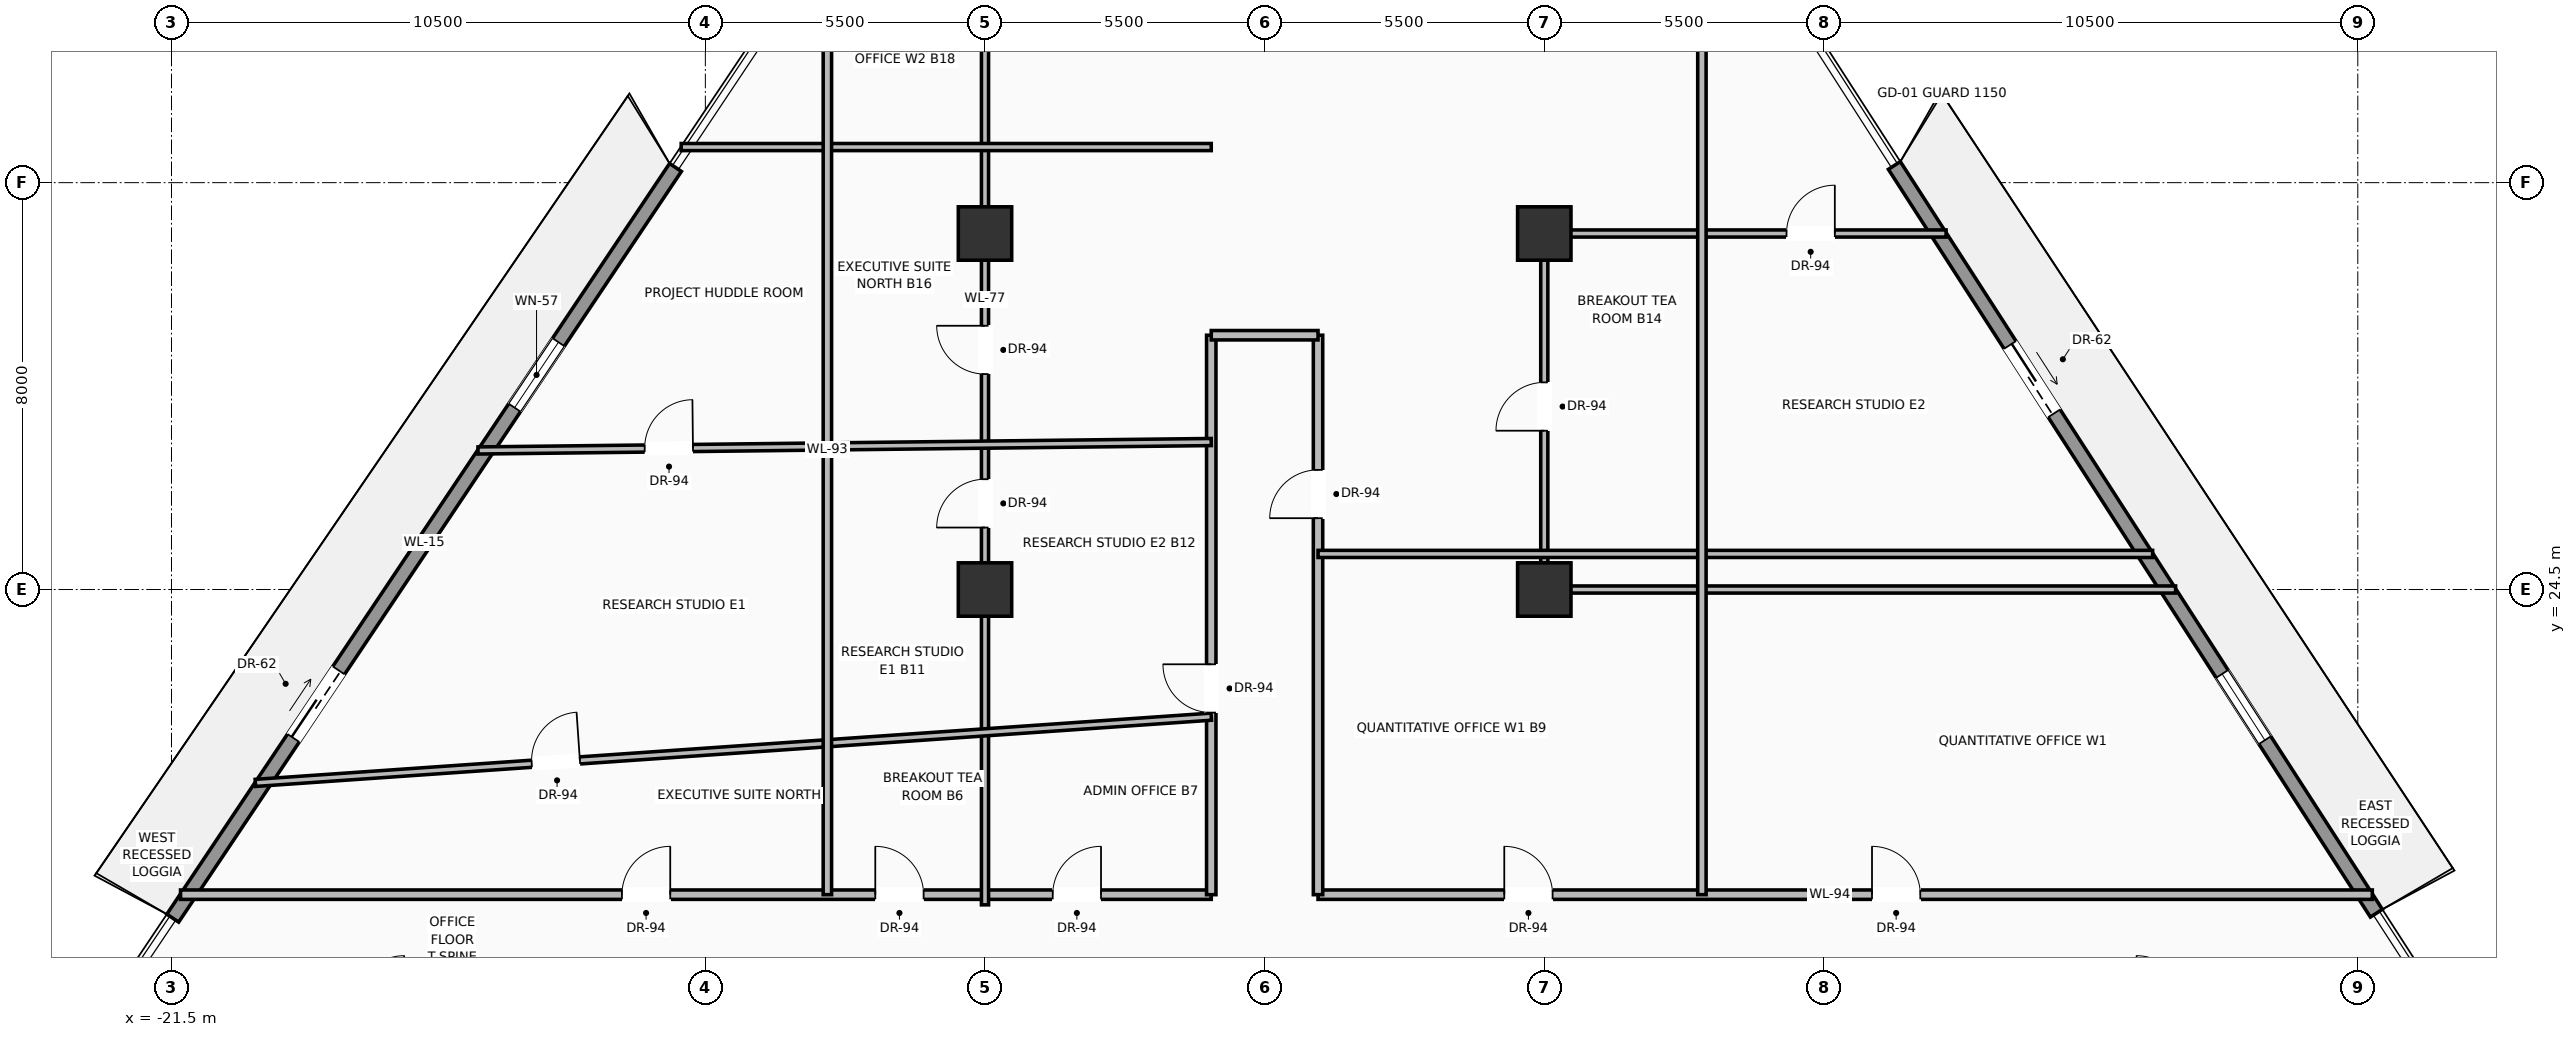
"""IFC4 building model, lengths in metres.
Left out: names, types, materials, properties, quantities, classifications, styles, units other than length and angle.
Written with IfcOpenShell. Run it as: python <this file> out.ifc"""

import sys

from ifc_helpers import new_model, si_unit, direction, frame, frame_2d, origin, origin_2d, place, context, subcontext, project, spatial, rectangle, extrude, source, transform, mapped, element, fill, save


model = new_model("IFC4")
c1 = context("Model", 3, precision=1e-05, world=origin(), true_north=direction((0.0, 1.0)))
c2 = subcontext(c1, "Body", "Model", "MODEL_VIEW")
j1 = project(units=[si_unit("LENGTHUNIT", "METRE"), si_unit("PLANEANGLEUNIT", "RADIAN")], contexts=[c1])
p1 = place(None, origin())
s1 = spatial("IfcSite", under=j1, at=p1, CompositionType="ELEMENT")
p2 = place(p1, origin())
s2 = spatial("IfcBuilding", under=s1, at=p2, CompositionType="ELEMENT")
p3 = place(p2, frame((0.0, 0.0, 102.5)))
s3 = spatial("IfcBuildingStorey", under=s2, at=p3, CompositionType="ELEMENT", Elevation=102.5)
m1 = source(origin(), c2, "Body", "SweptSolid", [
    extrude(rectangle(XDim=1.05, YDim=1.05, at=origin_2d()), origin(), (0.0, 0.0, 1.0), 3.7),
])
for number, where, z_axis, x_axis in (
    (1, (-5.5, 24.5, 0.0), (0.0, 0.0, 1.0), (1.0, 0.0, 0.0)),
    (2, (5.5, 24.5, 0.0), (0.0, 0.0, 1.0), (1.0, 0.0, 0.0)),
    (3, (-5.5, 31.5, 0.0), (0.0, 0.0, 1.0), (1.0, 0.0, 0.0)),
    (4, (5.5, 31.5, 0.0), (0.0, 0.0, 1.0), (1.0, 0.0, 0.0)),
):
    element("IfcColumn", number, at=place(p3, frame(where, z_axis=z_axis, x_axis=x_axis)), inside=s3, PredefinedType="COLUMN", context=c2, shape_type="MappedRepresentation", body=[
        mapped(m1, transform((0.0, 0.0, 0.0), scale=1.0)),
    ])
p4 = place(p3, frame((-21.475, 18.038, 0.0), z_axis=(0.0, 0.0, 1.0), x_axis=(0.556538112224, 0.830822080618, 0.0)))
e5 = element("IfcWall", 5, at=p4, inside=s3, PredefinedType="SOLIDWALL", context=c2, shape_type="SweptSolid", body=[
    extrude(rectangle(XDim=17.766, YDim=0.28, at=frame_2d((8.883, 0.0))), origin(), (0.0, 0.0, 1.0), 3.03),
])
p5 = place(p4, frame((4.264, 0.0, 0.0)))
e6 = element("IfcOpeningElement", 6, at=p5, cuts=e5, PredefinedType="OPENING", context=c2, shape_type="SweptSolid", body=[
    extrude(rectangle(XDim=1.6, YDim=2.35, at=frame_2d((0.8, 1.175))), frame((0.0, 0.15, 0.0), z_axis=(0.0, -1.0, 0.0), x_axis=(1.0, 0.0, 0.0)), (0.0, 0.0, 1.0), 0.3),
])
p6 = place(p4, frame((12.081, 0.0, 0.9)))
e7 = element("IfcOpeningElement", 7, at=p6, cuts=e5, PredefinedType="OPENING", context=c2, shape_type="SweptSolid", body=[
    extrude(rectangle(XDim=1.55, YDim=1.85, at=frame_2d((0.775, 0.925))), frame((0.0, 0.15, 0.0), z_axis=(0.0, -1.0, 0.0), x_axis=(1.0, 0.0, 0.0)), (0.0, 0.0, 1.0), 0.3),
])
p7 = place(p3, frame((12.385, 32.838, 0.0), z_axis=(0.0, 0.0, 1.0), x_axis=(0.541927229755, -0.840425414686, 0.0)))
e8 = element("IfcWall", 8, at=p7, inside=s3, PredefinedType="SOLIDWALL", context=c2, shape_type="SweptSolid", body=[
    extrude(rectangle(XDim=17.494, YDim=0.28, at=frame_2d((8.747, 0.0))), origin(), (0.0, 0.0, 1.0), 3.03),
])
p8 = place(p7, frame((4.198, 0.0, 0.0)))
e9 = element("IfcOpeningElement", 9, at=p8, cuts=e8, PredefinedType="OPENING", context=c2, shape_type="SweptSolid", body=[
    extrude(rectangle(XDim=1.6, YDim=2.35, at=frame_2d((0.8, 1.175))), frame((0.0, 0.15, 0.0), z_axis=(0.0, -1.0, 0.0), x_axis=(1.0, 0.0, 0.0)), (0.0, 0.0, 1.0), 0.3),
])
p9 = place(p7, frame((11.896, 0.0, 0.9)))
e10 = element("IfcOpeningElement", 10, at=p9, cuts=e8, PredefinedType="OPENING", context=c2, shape_type="SweptSolid", body=[
    extrude(rectangle(XDim=1.55, YDim=1.85, at=frame_2d((0.775, 0.925))), frame((0.0, 0.15, 0.0), z_axis=(0.0, -1.0, 0.0), x_axis=(1.0, 0.0, 0.0)), (0.0, 0.0, 1.0), 0.3),
])
p10 = place(p3, frame((-21.322, 18.5, 0.0), z_axis=(0.0, 0.0, 1.0), x_axis=(1.0, 0.0, 0.0)))
e11 = element("IfcWall", 11, at=p10, inside=s3, PredefinedType="PARTITIONING", context=c2, shape_type="SweptSolid", body=[
    extrude(rectangle(XDim=20.272, YDim=0.185, at=frame_2d((10.136, 0.0))), origin(), (0.0, 0.0, 1.0), 2.747),
])
p11 = place(p10, frame((8.681, 0.0, 0.0)))
e12 = element("IfcOpeningElement", 12, at=p11, cuts=e11, PredefinedType="OPENING", context=c2, shape_type="SweptSolid", body=[
    extrude(rectangle(XDim=0.95, YDim=2.2, at=frame_2d((0.475, 1.1))), frame((0.0, 0.103, 0.0), z_axis=(0.0, -1.0, 0.0), x_axis=(1.0, 0.0, 0.0)), (0.0, 0.0, 1.0), 0.205),
])
p12 = place(p10, frame((13.664, 0.0, 0.0)))
e13 = element("IfcOpeningElement", 13, at=p12, cuts=e11, PredefinedType="OPENING", context=c2, shape_type="SweptSolid", body=[
    extrude(rectangle(XDim=0.95, YDim=2.2, at=frame_2d((0.475, 1.1))), frame((0.0, 0.103, 0.0), z_axis=(0.0, -1.0, 0.0), x_axis=(1.0, 0.0, 0.0)), (0.0, 0.0, 1.0), 0.205),
])
p13 = place(p10, frame((17.154, 0.0, 0.0)))
e14 = element("IfcOpeningElement", 14, at=p13, cuts=e11, PredefinedType="OPENING", context=c2, shape_type="SweptSolid", body=[
    extrude(rectangle(XDim=0.95, YDim=2.2, at=frame_2d((0.475, 1.1))), frame((0.0, 0.103, 0.0), z_axis=(0.0, -1.0, 0.0), x_axis=(1.0, 0.0, 0.0)), (0.0, 0.0, 1.0), 0.205),
])
p14 = place(p3, frame((1.05, 18.5, 0.0), z_axis=(0.0, 0.0, 1.0), x_axis=(1.0, 0.0, 0.0)))
e15 = element("IfcWall", 15, at=p14, inside=s3, PredefinedType="PARTITIONING", context=c2, shape_type="SweptSolid", body=[
    extrude(rectangle(XDim=20.735, YDim=0.185, at=frame_2d((10.368, 0.0))), origin(), (0.0, 0.0, 1.0), 2.747),
])
p15 = place(p14, frame((10.896, 0.0, 0.0)))
e16 = element("IfcOpeningElement", 16, at=p15, cuts=e15, PredefinedType="OPENING", context=c2, shape_type="SweptSolid", body=[
    extrude(rectangle(XDim=0.95, YDim=2.2, at=frame_2d((0.475, 1.1))), frame((0.0, 0.103, 0.0), z_axis=(0.0, -1.0, 0.0), x_axis=(1.0, 0.0, 0.0)), (0.0, 0.0, 1.0), 0.205),
])
p16 = place(p14, frame((3.663, 0.0, 0.0)))
e17 = element("IfcOpeningElement", 17, at=p16, cuts=e15, PredefinedType="OPENING", context=c2, shape_type="SweptSolid", body=[
    extrude(rectangle(XDim=0.95, YDim=2.2, at=frame_2d((0.475, 1.1))), frame((0.0, 0.103, 0.0), z_axis=(0.0, -1.0, 0.0), x_axis=(1.0, 0.0, 0.0)), (0.0, 0.0, 1.0), 0.205),
])
p17 = place(p3, frame((-1.05, 18.5, 0.0), z_axis=(0.0, 0.0, 1.0), x_axis=(0.0, 1.0, 0.0)))
e18 = element("IfcWall", 18, at=p17, inside=s3, PredefinedType="PARTITIONING", context=c2, shape_type="SweptSolid", body=[
    extrude(rectangle(XDim=11.0, YDim=0.185, at=frame_2d((5.5, 0.0))), origin(), (0.0, 0.0, 1.0), 2.747),
])
p18 = place(p17, frame((3.58, 0.0, 0.0)))
e19 = element("IfcOpeningElement", 19, at=p18, cuts=e18, PredefinedType="OPENING", context=c2, shape_type="SweptSolid", body=[
    extrude(rectangle(XDim=0.95, YDim=2.2, at=frame_2d((0.475, 1.1))), frame((0.0, 0.103, 0.0), z_axis=(0.0, -1.0, 0.0), x_axis=(1.0, 0.0, 0.0)), (0.0, 0.0, 1.0), 0.205),
])
p19 = place(p3, frame((1.05, 18.5, 0.0), z_axis=(0.0, 0.0, 1.0), x_axis=(0.0, 1.0, 0.0)))
e20 = element("IfcWall", 20, at=p19, inside=s3, PredefinedType="PARTITIONING", context=c2, shape_type="SweptSolid", body=[
    extrude(rectangle(XDim=11.0, YDim=0.185, at=frame_2d((5.5, 0.0))), origin(), (0.0, 0.0, 1.0), 2.747),
])
p20 = place(p19, frame((7.403, 0.0, 0.0)))
e21 = element("IfcOpeningElement", 21, at=p20, cuts=e20, PredefinedType="OPENING", context=c2, shape_type="SweptSolid", body=[
    extrude(rectangle(XDim=0.95, YDim=2.2, at=frame_2d((0.475, 1.1))), frame((0.0, 0.103, 0.0), z_axis=(0.0, -1.0, 0.0), x_axis=(1.0, 0.0, 0.0)), (0.0, 0.0, 1.0), 0.205),
])
p21 = place(p3, frame((-1.05, 29.5, 0.0), z_axis=(0.0, 0.0, 1.0), x_axis=(1.0, 0.0, 0.0)))
e22 = element("IfcWall", 22, at=p21, inside=s3, PredefinedType="PARTITIONING", context=c2, shape_type="SweptSolid", body=[
    extrude(rectangle(XDim=2.1, YDim=0.185, at=frame_2d((1.05, 0.0))), origin(), (0.0, 0.0, 1.0), 3.442),
])
p22 = place(p3, frame((-5.5, 18.3, 0.0), z_axis=(0.0, 0.0, 1.0), x_axis=(0.0, 1.0, 0.0)))
e23 = element("IfcWall", 23, at=p22, inside=s3, PredefinedType="PARTITIONING", context=c2, shape_type="SweptSolid", body=[
    extrude(rectangle(XDim=23.82, YDim=0.14, at=frame_2d((11.91, 0.0))), origin(), (0.0, 0.0, 1.0), 2.747),
])
p23 = place(p22, frame((7.419, 0.0, 0.0)))
e24 = element("IfcOpeningElement", 24, at=p23, cuts=e23, PredefinedType="OPENING", context=c2, shape_type="SweptSolid", body=[
    extrude(rectangle(XDim=0.95, YDim=2.2, at=frame_2d((0.475, 1.1))), frame((0.0, 0.08, 0.0), z_axis=(0.0, -1.0, 0.0), x_axis=(1.0, 0.0, 0.0)), (0.0, 0.0, 1.0), 0.16),
])
p24 = place(p22, frame((10.436, 0.0, 0.0)))
e25 = element("IfcOpeningElement", 25, at=p24, cuts=e23, PredefinedType="OPENING", context=c2, shape_type="SweptSolid", body=[
    extrude(rectangle(XDim=0.95, YDim=2.2, at=frame_2d((0.475, 1.1))), frame((0.0, 0.08, 0.0), z_axis=(0.0, -1.0, 0.0), x_axis=(1.0, 0.0, 0.0)), (0.0, 0.0, 1.0), 0.16),
])
p25 = place(p22, frame((18.418, 0.0, 0.0)))
e26 = element("IfcOpeningElement", 26, at=p25, cuts=e23, PredefinedType="OPENING", context=c2, shape_type="SweptSolid", body=[
    extrude(rectangle(XDim=0.95, YDim=2.2, at=frame_2d((0.475, 1.1))), frame((0.0, 0.08, 0.0), z_axis=(0.0, -1.0, 0.0), x_axis=(1.0, 0.0, 0.0)), (0.0, 0.0, 1.0), 0.16),
])
p26 = place(p3, frame((5.5, 24.5, 0.0), z_axis=(0.0, 0.0, 1.0), x_axis=(1.0, 0.0, 0.0)))
e27 = element("IfcWall", 27, at=p26, inside=s3, PredefinedType="PARTITIONING", context=c2, shape_type="SweptSolid", body=[
    extrude(rectangle(XDim=12.417, YDim=0.14, at=frame_2d((6.208, 0.0))), origin(), (0.0, 0.0, 1.0), 2.747),
])
p27 = place(p3, frame((5.5, 24.5, 0.0), z_axis=(0.0, 0.0, 1.0), x_axis=(0.0, 1.0, 0.0)))
e28 = element("IfcWall", 28, at=p27, inside=s3, PredefinedType="PARTITIONING", context=c2, shape_type="SweptSolid", body=[
    extrude(rectangle(XDim=7.0, YDim=0.14, at=frame_2d((3.5, 0.0))), origin(), (0.0, 0.0, 1.0), 2.747),
])
p28 = place(p27, frame((3.123, 0.0, 0.0)))
e29 = element("IfcOpeningElement", 29, at=p28, cuts=e28, PredefinedType="OPENING", context=c2, shape_type="SweptSolid", body=[
    extrude(rectangle(XDim=0.95, YDim=2.2, at=frame_2d((0.475, 1.1))), frame((0.0, 0.08, 0.0), z_axis=(0.0, -1.0, 0.0), x_axis=(1.0, 0.0, 0.0)), (0.0, 0.0, 1.0), 0.16),
])
p29 = place(p3, frame((5.5, 31.5, 0.0), z_axis=(0.0, 0.0, 1.0), x_axis=(1.0, 0.0, 0.0)))
e30 = element("IfcWall", 30, at=p29, inside=s3, PredefinedType="PARTITIONING", context=c2, shape_type="SweptSolid", body=[
    extrude(rectangle(XDim=7.903, YDim=0.14, at=frame_2d((3.951, 0.0))), origin(), (0.0, 0.0, 1.0), 2.747),
])
p30 = place(p29, frame((4.764, 0.0, 0.0)))
e31 = element("IfcOpeningElement", 31, at=p30, cuts=e30, PredefinedType="OPENING", context=c2, shape_type="SweptSolid", body=[
    extrude(rectangle(XDim=0.95, YDim=2.2, at=frame_2d((0.475, 1.1))), frame((0.0, 0.08, 0.0), z_axis=(0.0, -1.0, 0.0), x_axis=(1.0, 0.0, 0.0)), (0.0, 0.0, 1.0), 0.16),
])
p31 = place(p3, frame((-19.85, 20.698, 0.0), z_axis=(0.0, 0.0, 1.0), x_axis=(0.997608661769, 0.069115540686, 0.0)))
e32 = element("IfcWall", 32, at=p31, inside=s3, PredefinedType="PARTITIONING", context=c2, shape_type="SweptSolid", body=[
    extrude(rectangle(XDim=18.845, YDim=0.14, at=frame_2d((9.423, 0.0))), origin(), (0.0, 0.0, 1.0), 2.747),
])
p32 = place(p31, frame((5.448, 0.0, 0.0)))
e33 = element("IfcOpeningElement", 33, at=p32, cuts=e32, PredefinedType="OPENING", context=c2, shape_type="SweptSolid", body=[
    extrude(rectangle(XDim=0.95, YDim=2.2, at=frame_2d((0.475, 1.1))), frame((0.0, 0.08, 0.0), z_axis=(0.0, -1.0, 0.0), x_axis=(1.0, 0.0, 0.0)), (0.0, 0.0, 1.0), 0.16),
])
p33 = place(p3, frame((-15.472, 27.234, 0.0), z_axis=(0.0, 0.0, 1.0), x_axis=(0.999933748453, 0.011510808162, 0.0)))
e34 = element("IfcWall", 34, at=p33, inside=s3, PredefinedType="PARTITIONING", context=c2, shape_type="SweptSolid", body=[
    extrude(rectangle(XDim=14.423, YDim=0.14, at=frame_2d((7.211, 0.0))), origin(), (0.0, 0.0, 1.0), 2.747),
])
p34 = place(p33, frame((3.278, 0.0, 0.0)))
e35 = element("IfcOpeningElement", 35, at=p34, cuts=e34, PredefinedType="OPENING", context=c2, shape_type="SweptSolid", body=[
    extrude(rectangle(XDim=0.95, YDim=2.2, at=frame_2d((0.475, 1.1))), frame((0.0, 0.08, 0.0), z_axis=(0.0, -1.0, 0.0), x_axis=(1.0, 0.0, 0.0)), (0.0, 0.0, 1.0), 0.16),
])
p35 = place(p3, frame((-11.475, 33.2, 0.0), z_axis=(0.0, 0.0, 1.0), x_axis=(1.0, 0.0, 0.0)))
e36 = element("IfcWall", 36, at=p35, inside=s3, PredefinedType="PARTITIONING", context=c2, shape_type="SweptSolid", body=[
    extrude(rectangle(XDim=10.425, YDim=0.14, at=frame_2d((5.212, 0.0))), origin(), (0.0, 0.0, 1.0), 2.747),
])
p36 = place(p3, frame((1.05, 25.2, 0.0), z_axis=(0.0, 0.0, 1.0), x_axis=(1.0, 0.0, 0.0)))
e37 = element("IfcWall", 37, at=p36, inside=s3, PredefinedType="PARTITIONING", context=c2, shape_type="SweptSolid", body=[
    extrude(rectangle(XDim=16.415, YDim=0.14, at=frame_2d((8.208, 0.0))), origin(), (0.0, 0.0, 1.0), 2.747),
])
for number, where, z_axis, x_axis in (
    (38, (-8.6, 18.5, 0.0), (0.0, 0.0, 1.0), (0.0, 1.0, 0.0)),
    (39, (8.6, 18.5, 0.0), (0.0, 0.0, 1.0), (0.0, 1.0, 0.0)),
):
    element("IfcWall", number, at=place(p3, frame(where, z_axis=z_axis, x_axis=x_axis)), inside=s3, PredefinedType="PARTITIONING", context=c2, shape_type="SweptSolid", body=[
        extrude(rectangle(XDim=17.5, YDim=0.165, at=frame_2d((8.75, 0.0))), origin(), (0.0, 0.0, 1.0), 2.747),
    ])
m2 = source(origin(), c2, "Body", "SweptSolid", [
    extrude(rectangle(XDim=1.6, YDim=2.35, at=frame_2d((0.8, 1.175))), frame((0.0, 0.025, 0.0), z_axis=(0.0, -1.0, 0.0), x_axis=(1.0, 0.0, 0.0)), (0.0, 0.0, 1.0), 0.05),
])
p37 = place(p5, origin())
e40 = element("IfcDoor", 40, at=p37, inside=s3, OperationType="SLIDING_TO_LEFT", PredefinedType="DOOR", context=c2, shape_type="MappedRepresentation", body=[
    mapped(m2, transform((0.0, 0.0, 0.0), scale=1.0)),
])
fill(e6, e40)
m3 = source(origin(), c2, "Body", "SweptSolid", [
    extrude(rectangle(XDim=1.55, YDim=1.85, at=frame_2d((0.775, 0.925))), frame((0.0, 0.03, 0.0), z_axis=(0.0, -1.0, 0.0), x_axis=(1.0, 0.0, 0.0)), (0.0, 0.0, 1.0), 0.06),
])
p38 = place(p6, origin())
e41 = element("IfcWindow", 41, at=p38, inside=s3, PartitioningType="SINGLE_PANEL", PredefinedType="WINDOW", context=c2, shape_type="MappedRepresentation", body=[
    mapped(m3, transform((0.0, 0.0, 0.0), scale=1.0)),
])
fill(e7, e41)
p39 = place(p8, origin())
e42 = element("IfcDoor", 42, at=p39, inside=s3, OperationType="SLIDING_TO_RIGHT", PredefinedType="DOOR", context=c2, shape_type="MappedRepresentation", body=[
    mapped(m2, transform((0.0, 0.0, 0.0), scale=1.0)),
])
fill(e9, e42)
p40 = place(p9, origin())
e43 = element("IfcWindow", 43, at=p40, inside=s3, PartitioningType="SINGLE_PANEL", PredefinedType="WINDOW", context=c2, shape_type="MappedRepresentation", body=[
    mapped(m3, transform((0.0, 0.0, 0.0), scale=1.0)),
])
fill(e10, e43)
m4 = source(origin(), c2, "Body", "SweptSolid", [
    extrude(rectangle(XDim=0.95, YDim=2.2, at=frame_2d((0.475, 1.1))), frame((0.0, 0.025, 0.0), z_axis=(0.0, -1.0, 0.0), x_axis=(1.0, 0.0, 0.0)), (0.0, 0.0, 1.0), 0.05),
])
p41 = place(p11, origin())
e44 = element("IfcDoor", 44, at=p41, inside=s3, OperationType="SINGLE_SWING_RIGHT", PredefinedType="DOOR", context=c2, shape_type="MappedRepresentation", body=[
    mapped(m4, transform((0.0, 0.0, 0.0), scale=1.0)),
])
fill(e12, e44)
p42 = place(p15, origin())
e45 = element("IfcDoor", 45, at=p42, inside=s3, OperationType="SINGLE_SWING_LEFT", PredefinedType="DOOR", context=c2, shape_type="MappedRepresentation", body=[
    mapped(m4, transform((0.0, 0.0, 0.0), scale=1.0)),
])
fill(e16, e45)
p43 = place(p18, origin())
e46 = element("IfcDoor", 46, at=p43, inside=s3, OperationType="SINGLE_SWING_RIGHT", PredefinedType="DOOR", context=c2, shape_type="MappedRepresentation", body=[
    mapped(m4, transform((0.0, 0.0, 0.0), scale=1.0)),
])
fill(e19, e46)
p44 = place(p20, origin())
e47 = element("IfcDoor", 47, at=p44, inside=s3, OperationType="SINGLE_SWING_LEFT", PredefinedType="DOOR", context=c2, shape_type="MappedRepresentation", body=[
    mapped(m4, transform((0.0, 0.0, 0.0), scale=1.0)),
])
fill(e21, e47)
p45 = place(p12, origin())
e48 = element("IfcDoor", 48, at=p45, inside=s3, OperationType="SINGLE_SWING_LEFT", PredefinedType="DOOR", context=c2, shape_type="MappedRepresentation", body=[
    mapped(m4, transform((0.0, 0.0, 0.0), scale=1.0)),
])
fill(e13, e48)
p46 = place(p13, origin())
e49 = element("IfcDoor", 49, at=p46, inside=s3, OperationType="SINGLE_SWING_RIGHT", PredefinedType="DOOR", context=c2, shape_type="MappedRepresentation", body=[
    mapped(m4, transform((0.0, 0.0, 0.0), scale=1.0)),
])
fill(e14, e49)
p47 = place(p16, origin())
e50 = element("IfcDoor", 50, at=p47, inside=s3, OperationType="SINGLE_SWING_LEFT", PredefinedType="DOOR", context=c2, shape_type="MappedRepresentation", body=[
    mapped(m4, transform((0.0, 0.0, 0.0), scale=1.0)),
])
fill(e17, e50)
p48 = place(p32, origin())
e51 = element("IfcDoor", 51, at=p48, inside=s3, OperationType="SINGLE_SWING_RIGHT", PredefinedType="DOOR", context=c2, shape_type="MappedRepresentation", body=[
    mapped(m4, transform((0.0, 0.0, 0.0), scale=1.0)),
])
fill(e33, e51)
p49 = place(p23, origin())
e52 = element("IfcDoor", 52, at=p49, inside=s3, OperationType="SINGLE_SWING_LEFT", PredefinedType="DOOR", context=c2, shape_type="MappedRepresentation", body=[
    mapped(m4, transform((0.0, 0.0, 0.0), scale=1.0)),
])
fill(e24, e52)
p50 = place(p30, origin())
e53 = element("IfcDoor", 53, at=p50, inside=s3, OperationType="SINGLE_SWING_RIGHT", PredefinedType="DOOR", context=c2, shape_type="MappedRepresentation", body=[
    mapped(m4, transform((0.0, 0.0, 0.0), scale=1.0)),
])
fill(e31, e53)
p51 = place(p28, origin())
e54 = element("IfcDoor", 54, at=p51, inside=s3, OperationType="SINGLE_SWING_LEFT", PredefinedType="DOOR", context=c2, shape_type="MappedRepresentation", body=[
    mapped(m4, transform((0.0, 0.0, 0.0), scale=1.0)),
])
fill(e29, e54)
p52 = place(p24, origin())
e55 = element("IfcDoor", 55, at=p52, inside=s3, OperationType="SINGLE_SWING_RIGHT", PredefinedType="DOOR", context=c2, shape_type="MappedRepresentation", body=[
    mapped(m4, transform((0.0, 0.0, 0.0), scale=1.0)),
])
fill(e25, e55)
p53 = place(p34, origin())
e56 = element("IfcDoor", 56, at=p53, inside=s3, OperationType="SINGLE_SWING_RIGHT", PredefinedType="DOOR", context=c2, shape_type="MappedRepresentation", body=[
    mapped(m4, transform((0.0, 0.0, 0.0), scale=1.0)),
])
fill(e35, e56)
save(model, sys.argv[1])
